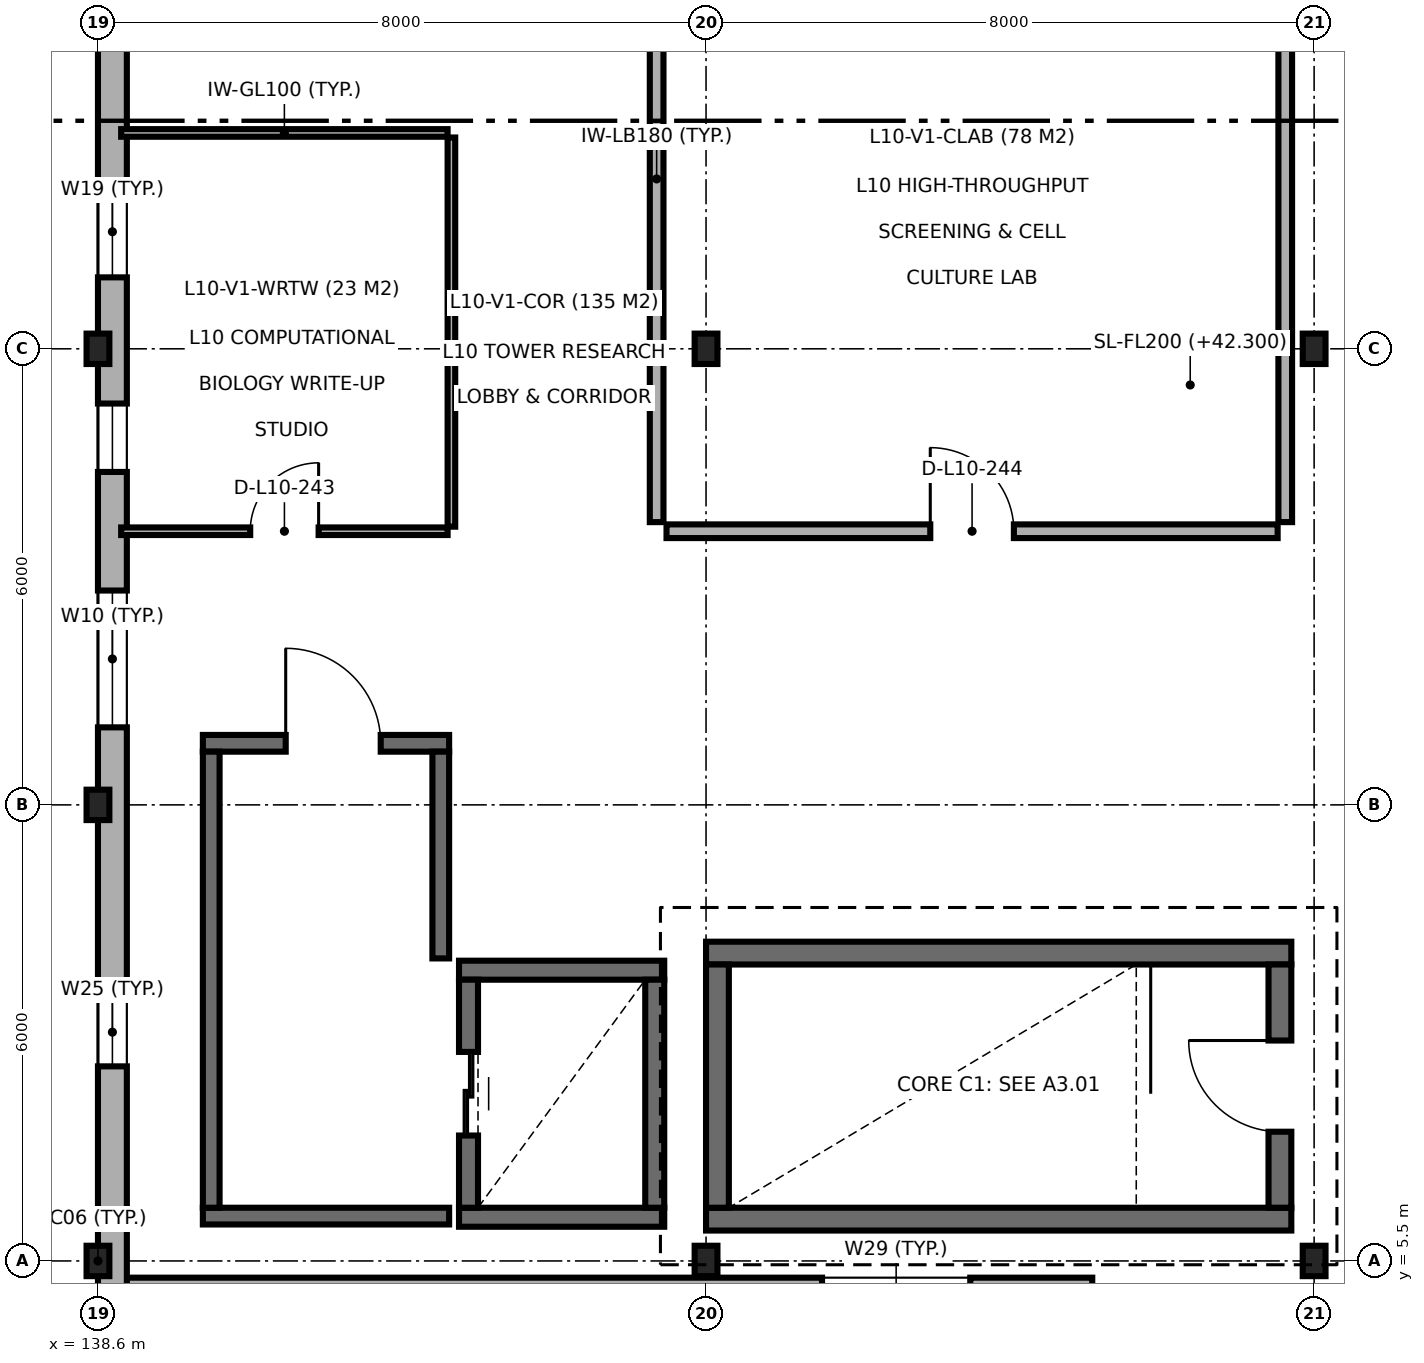
"""IFC4 building model, lengths in metres.
Left out: names, types, materials, properties, quantities, classifications, styles, units other than length and angle.
Written with IfcOpenShell. Run it as: python <this file> out.ifc"""

import sys

from ifc_helpers import new_model, si_unit, direction, frame, frame_2d, origin, origin_2d, place, context, subcontext, project, spatial, rectangle, i_section, extrude, element, fill, save


model = new_model("IFC4")
c1 = context("Model", 3, precision=1e-05, world=origin(), true_north=direction((0.0, 1.0)))
c2 = subcontext(c1, "Body", "Model", "MODEL_VIEW")
j1 = project(units=[si_unit("LENGTHUNIT", "METRE"), si_unit("PLANEANGLEUNIT", "RADIAN")], contexts=[c1])
p1 = place(None, origin())
s1 = spatial("IfcSite", under=j1, at=p1, CompositionType="ELEMENT")
p2 = place(p1, origin())
s2 = spatial("IfcBuilding", under=s1, at=p2, CompositionType="ELEMENT")
p3 = place(p2, frame((0.0, 0.0, 42.3)))
s3 = spatial("IfcBuildingStorey", under=s2, at=p3, CompositionType="ELEMENT", Elevation=42.3)
for number, where, z_axis, x_axis in (
    (1, (138.6, 5.5, 0.0), (0.0, 0.0, 1.0), (1.0, 0.0, 0.0)),
    (2, (138.6, 11.5, 0.0), (0.0, 0.0, 1.0), (1.0, 0.0, 0.0)),
    (3, (138.6, 17.5, 0.0), (0.0, 0.0, 1.0), (1.0, 0.0, 0.0)),
    (4, (146.6, 5.5, 0.0), (0.0, 0.0, 1.0), (1.0, 0.0, 0.0)),
    (5, (146.6, 17.5, 0.0), (0.0, 0.0, 1.0), (1.0, 0.0, 0.0)),
    (6, (154.6, 5.5, 0.0), (0.0, 0.0, 1.0), (1.0, 0.0, 0.0)),
    (7, (154.6, 17.5, 0.0), (0.0, 0.0, 1.0), (1.0, 0.0, 0.0)),
):
    element("IfcColumn", number, at=place(p3, frame(where, z_axis=z_axis, x_axis=x_axis)), inside=s3, PredefinedType="COLUMN", context=c2, shape_type="SweptSolid", body=[
        extrude(i_section(OverallWidth=0.3, OverallDepth=0.4, WebThickness=0.013, FlangeThickness=0.024, FilletRadius=0.027, at=origin_2d()), origin(), (0.0, 0.0, 1.0), 3.9),
    ])
for number, where, z_axis, x_axis in (
    (8, (146.6, 6.05, 0.0), (0.0, 0.0, 1.0), (1.0, 0.0, 0.0)),
    (9, (154.3, 9.55, 0.0), (0.0, 0.0, 1.0), (-1.0, 0.0, 0.0)),
):
    element("IfcWall", number, at=place(p3, frame(where, z_axis=z_axis, x_axis=x_axis)), inside=s3, PredefinedType="SHEAR", context=c2, shape_type="SweptSolid", body=[
        extrude(rectangle(XDim=7.7, YDim=0.3, at=frame_2d((3.85, 0.0))), origin(), (0.0, 0.0, 1.0), 3.9),
    ])
p4 = place(p3, frame((146.75, 9.4, 0.0), z_axis=(0.0, 0.0, 1.0), x_axis=(0.0, -1.0, 0.0)))
e10 = element("IfcWall", 10, at=p4, inside=s3, PredefinedType="SHEAR", context=c2, shape_type="SweptSolid", body=[
    extrude(rectangle(XDim=3.2, YDim=0.3, at=frame_2d((1.6, 0.0))), origin(), (0.0, 0.0, 1.0), 3.9),
])
p5 = place(p3, frame((154.15, 6.2, 0.0), z_axis=(0.0, 0.0, 1.0), x_axis=(0.0, 1.0, 0.0)))
e11 = element("IfcWall", 11, at=p5, inside=s3, PredefinedType="SHEAR", context=c2, shape_type="SweptSolid", body=[
    extrude(rectangle(XDim=3.2, YDim=0.3, at=frame_2d((1.6, 0.0))), origin(), (0.0, 0.0, 1.0), 3.9),
])
p6 = place(p5, frame((1.0, 0.0, 0.0)))
e12 = element("IfcOpeningElement", 12, at=p6, cuts=e11, PredefinedType="OPENING", context=c2, shape_type="SweptSolid", body=[
    extrude(rectangle(XDim=1.2, YDim=2.15, at=frame_2d((0.6, 1.075))), frame((0.0, 0.16, 0.0), z_axis=(0.0, -1.0, 0.0), x_axis=(1.0, 0.0, 0.0)), (0.0, 0.0, 1.0), 0.32),
])
for number, where, z_axis, x_axis in (
    (13, (143.35, 6.075, 0.0), (0.0, 0.0, 1.0), (1.0, 0.0, 0.0)),
    (14, (146.05, 9.325, 0.0), (0.0, 0.0, 1.0), (-1.0, 0.0, 0.0)),
):
    element("IfcWall", number, at=place(p3, frame(where, z_axis=z_axis, x_axis=x_axis)), inside=s3, PredefinedType="SHEAR", context=c2, shape_type="SweptSolid", body=[
        extrude(rectangle(XDim=2.7, YDim=0.25, at=frame_2d((1.35, 0.0))), origin(), (0.0, 0.0, 1.0), 3.9),
    ])
p7 = place(p3, frame((143.475, 9.2, 0.0), z_axis=(0.0, 0.0, 1.0), x_axis=(0.0, -1.0, 0.0)))
e15 = element("IfcWall", 15, at=p7, inside=s3, PredefinedType="SHEAR", context=c2, shape_type="SweptSolid", body=[
    extrude(rectangle(XDim=3.0, YDim=0.25, at=frame_2d((1.5, 0.0))), origin(), (0.0, 0.0, 1.0), 3.9),
])
p8 = place(p7, frame((0.95, 0.0, 0.0)))
e16 = element("IfcOpeningElement", 16, at=p8, cuts=e15, PredefinedType="OPENING", context=c2, shape_type="SweptSolid", body=[
    extrude(rectangle(XDim=1.1, YDim=2.15, at=frame_2d((0.55, 1.075))), frame((0.0, 0.135, 0.0), z_axis=(0.0, -1.0, 0.0), x_axis=(1.0, 0.0, 0.0)), (0.0, 0.0, 1.0), 0.27),
])
p9 = place(p3, frame((145.925, 6.2, 0.0), z_axis=(0.0, 0.0, 1.0), x_axis=(0.0, 1.0, 0.0)))
e17 = element("IfcWall", 17, at=p9, inside=s3, PredefinedType="SHEAR", context=c2, shape_type="SweptSolid", body=[
    extrude(rectangle(XDim=3.0, YDim=0.25, at=frame_2d((1.5, 0.0))), origin(), (0.0, 0.0, 1.0), 3.9),
])
p10 = place(p3, frame((139.98, 6.09, 0.0), z_axis=(0.0, 0.0, 1.0), x_axis=(1.0, 0.0, 0.0)))
e18 = element("IfcWall", 18, at=p10, inside=s3, PredefinedType="SOLIDWALL", context=c2, shape_type="SweptSolid", body=[
    extrude(rectangle(XDim=3.24, YDim=0.22, at=frame_2d((1.62, 0.0))), origin(), (0.0, 0.0, 1.0), 3.66),
])
p11 = place(p3, frame((143.22, 12.31, 0.0), z_axis=(0.0, 0.0, 1.0), x_axis=(-1.0, 0.0, 0.0)))
e19 = element("IfcWall", 19, at=p11, inside=s3, PredefinedType="SOLIDWALL", context=c2, shape_type="SweptSolid", body=[
    extrude(rectangle(XDim=3.24, YDim=0.22, at=frame_2d((1.62, 0.0))), origin(), (0.0, 0.0, 1.0), 3.66),
])
p12 = place(p11, frame((0.9, 0.0, 0.0)))
e20 = element("IfcOpeningElement", 20, at=p12, cuts=e19, PredefinedType="OPENING", context=c2, shape_type="SweptSolid", body=[
    extrude(rectangle(XDim=1.25, YDim=2.15, at=frame_2d((0.625, 1.075))), frame((0.0, 0.12, 0.0), z_axis=(0.0, -1.0, 0.0), x_axis=(1.0, 0.0, 0.0)), (0.0, 0.0, 1.0), 0.24),
])
p13 = place(p3, frame((140.09, 12.2, 0.0), z_axis=(0.0, 0.0, 1.0), x_axis=(0.0, -1.0, 0.0)))
e21 = element("IfcWall", 21, at=p13, inside=s3, PredefinedType="SOLIDWALL", context=c2, shape_type="SweptSolid", body=[
    extrude(rectangle(XDim=6.0, YDim=0.22, at=frame_2d((3.0, 0.0))), origin(), (0.0, 0.0, 1.0), 3.66),
])
p14 = place(p3, frame((143.11, 9.48, 0.0), z_axis=(0.0, 0.0, 1.0), x_axis=(0.0, 1.0, 0.0)))
e22 = element("IfcWall", 22, at=p14, inside=s3, PredefinedType="SOLIDWALL", context=c2, shape_type="SweptSolid", body=[
    extrude(rectangle(XDim=2.72, YDim=0.22, at=frame_2d((1.36, 0.0))), origin(), (0.0, 0.0, 1.0), 3.66),
])
p15 = place(p3, frame((138.962, 5.09, 0.0), z_axis=(0.0, 0.0, 1.0), x_axis=(1.0, 0.0, 0.0)))
e23 = element("IfcWall", 23, at=p15, inside=s3, PredefinedType="SOLIDWALL", context=c2, shape_type="SweptSolid", body=[
    extrude(rectangle(XDim=12.719, YDim=0.38, at=frame_2d((6.359, 0.0))), origin(), (0.0, 0.0, 1.0), 3.66),
])
p16 = place(p15, frame((9.164, 0.0, 0.9)))
e24 = element("IfcOpeningElement", 24, at=p16, cuts=e23, PredefinedType="OPENING", context=c2, shape_type="SweptSolid", body=[
    extrude(rectangle(XDim=1.95, YDim=1.95, at=frame_2d((0.975, 0.975))), frame((0.0, 0.2, 0.0), z_axis=(0.0, -1.0, 0.0), x_axis=(1.0, 0.0, 0.0)), (0.0, 0.0, 1.0), 0.4),
])
p17 = place(p3, frame((138.79, 29.138, 0.0), z_axis=(0.0, 0.0, 1.0), x_axis=(0.0, -1.0, 0.0)))
e25 = element("IfcWall", 25, at=p17, inside=s3, PredefinedType="SOLIDWALL", context=c2, shape_type="SweptSolid", body=[
    extrude(rectangle(XDim=24.238, YDim=0.38, at=frame_2d((12.119, 0.0))), origin(), (0.0, 0.0, 1.0), 3.66),
])
p18 = place(p17, frame((1.664, 0.0, 0.9)))
e26 = element("IfcOpeningElement", 26, at=p18, cuts=e25, PredefinedType="OPENING", context=c2, shape_type="SweptSolid", body=[
    extrude(rectangle(XDim=1.8, YDim=1.5, at=frame_2d((0.9, 0.75))), frame((0.0, 0.2, 0.0), z_axis=(0.0, -1.0, 0.0), x_axis=(1.0, 0.0, 0.0)), (0.0, 0.0, 1.0), 0.4),
])
p19 = place(p17, frame((9.498, 0.0, 0.9)))
e27 = element("IfcOpeningElement", 27, at=p19, cuts=e25, PredefinedType="OPENING", context=c2, shape_type="SweptSolid", body=[
    extrude(rectangle(XDim=1.2, YDim=2.4, at=frame_2d((0.6, 1.2))), frame((0.0, 0.2, 0.0), z_axis=(0.0, -1.0, 0.0), x_axis=(1.0, 0.0, 0.0)), (0.0, 0.0, 1.0), 0.4),
])
p20 = place(p17, frame((12.358, 0.0, 0.9)))
e28 = element("IfcOpeningElement", 28, at=p20, cuts=e25, PredefinedType="OPENING", context=c2, shape_type="SweptSolid", body=[
    extrude(rectangle(XDim=0.9, YDim=1.8, at=frame_2d((0.45, 0.9))), frame((0.0, 0.2, 0.0), z_axis=(0.0, -1.0, 0.0), x_axis=(1.0, 0.0, 0.0)), (0.0, 0.0, 1.0), 0.4),
])
p21 = place(p17, frame((14.818, 0.0, 0.9)))
e29 = element("IfcOpeningElement", 29, at=p21, cuts=e25, PredefinedType="OPENING", context=c2, shape_type="SweptSolid", body=[
    extrude(rectangle(XDim=1.8, YDim=2.1, at=frame_2d((0.9, 1.05))), frame((0.0, 0.2, 0.0), z_axis=(0.0, -1.0, 0.0), x_axis=(1.0, 0.0, 0.0)), (0.0, 0.0, 1.0), 0.4),
])
p22 = place(p17, frame((20.178, 0.0, 0.9)))
e30 = element("IfcOpeningElement", 30, at=p22, cuts=e25, PredefinedType="OPENING", context=c2, shape_type="SweptSolid", body=[
    extrude(rectangle(XDim=0.9, YDim=1.4, at=frame_2d((0.45, 0.7))), frame((0.0, 0.2, 0.0), z_axis=(0.0, -1.0, 0.0), x_axis=(1.0, 0.0, 0.0)), (0.0, 0.0, 1.0), 0.4),
])
p23 = place(p3, frame((138.905, 20.34, 0.0), z_axis=(0.0, 0.0, 1.0), x_axis=(1.0, 0.0, 0.0)))
e31 = element("IfcWall", 31, at=p23, inside=s3, PredefinedType="PARTITIONING", context=c2, shape_type="SweptSolid", body=[
    extrude(rectangle(XDim=4.295, YDim=0.1, at=frame_2d((2.147, 0.0))), origin(), (0.0, 0.0, 1.0), 3.68),
])
p24 = place(p3, frame((143.25, 15.16, 0.0), z_axis=(0.0, 0.0, 1.0), x_axis=(0.0, 1.0, 0.0)))
e32 = element("IfcWall", 32, at=p24, inside=s3, PredefinedType="PARTITIONING", context=c2, shape_type="SweptSolid", body=[
    extrude(rectangle(XDim=5.12, YDim=0.1, at=frame_2d((2.56, 0.0))), origin(), (0.0, 0.0, 1.0), 3.68),
])
p25 = place(p3, frame((138.905, 15.1, 0.0), z_axis=(0.0, 0.0, 1.0), x_axis=(1.0, 0.0, 0.0)))
e33 = element("IfcWall", 33, at=p25, inside=s3, PredefinedType="PARTITIONING", context=c2, shape_type="SweptSolid", body=[
    extrude(rectangle(XDim=4.295, YDim=0.1, at=frame_2d((2.147, 0.0))), origin(), (0.0, 0.0, 1.0), 3.68),
])
p26 = place(p25, frame((1.698, 0.0, 0.0)))
e34 = element("IfcOpeningElement", 34, at=p26, cuts=e33, PredefinedType="OPENING", context=c2, shape_type="SweptSolid", body=[
    extrude(rectangle(XDim=0.9, YDim=2.1, at=frame_2d((0.45, 1.05))), frame((0.0, 0.06, 0.0), z_axis=(0.0, -1.0, 0.0), x_axis=(1.0, 0.0, 0.0)), (0.0, 0.0, 1.0), 0.12),
])
for number, where, z_axis, x_axis in (
    (35, (145.95, 15.22, 0.0), (0.0, 0.0, 1.0), (0.0, 1.0, 0.0)),
    (36, (154.22, 15.22, 0.0), (0.0, 0.0, 1.0), (0.0, 1.0, 0.0)),
):
    element("IfcWall", number, at=place(p3, frame(where, z_axis=z_axis, x_axis=x_axis)), inside=s3, PredefinedType="PARTITIONING", context=c2, shape_type="SweptSolid", body=[
        extrude(rectangle(XDim=9.03, YDim=0.18, at=frame_2d((4.515, 0.0))), origin(), (0.0, 0.0, 1.0), 3.68),
    ])
p27 = place(p3, frame((146.08, 15.1, 0.0), z_axis=(0.0, 0.0, 1.0), x_axis=(1.0, 0.0, 0.0)))
e37 = element("IfcWall", 37, at=p27, inside=s3, PredefinedType="PARTITIONING", context=c2, shape_type="SweptSolid", body=[
    extrude(rectangle(XDim=8.04, YDim=0.18, at=frame_2d((4.02, 0.0))), origin(), (0.0, 0.0, 1.0), 3.68),
])
p28 = place(p27, frame((3.47, 0.0, 0.0)))
e38 = element("IfcOpeningElement", 38, at=p28, cuts=e37, PredefinedType="OPENING", context=c2, shape_type="SweptSolid", body=[
    extrude(rectangle(XDim=1.1, YDim=2.15, at=frame_2d((0.55, 1.075))), frame((0.0, 0.1, 0.0), z_axis=(0.0, -1.0, 0.0), x_axis=(1.0, 0.0, 0.0)), (0.0, 0.0, 1.0), 0.2),
])
p29 = place(p6, origin())
e39 = element("IfcDoor", 39, at=p29, inside=s3, OperationType="SINGLE_SWING_RIGHT", PredefinedType="DOOR", context=c2, shape_type="SweptSolid", body=[
    extrude(rectangle(XDim=1.2, YDim=2.15, at=frame_2d((0.6, 1.075))), frame((0.0, 0.025, 0.0), z_axis=(0.0, -1.0, 0.0), x_axis=(1.0, 0.0, 0.0)), (0.0, 0.0, 1.0), 0.05),
])
fill(e12, e39)
p30 = place(p8, origin())
e40 = element("IfcDoor", 40, at=p30, inside=s3, OperationType="DOUBLE_DOOR_SLIDING", PredefinedType="DOOR", context=c2, shape_type="SweptSolid", body=[
    extrude(rectangle(XDim=1.1, YDim=2.15, at=frame_2d((0.55, 1.075))), frame((0.0, 0.025, 0.0), z_axis=(0.0, -1.0, 0.0), x_axis=(1.0, 0.0, 0.0)), (0.0, 0.0, 1.0), 0.05),
])
fill(e16, e40)
p31 = place(p12, frame((1.25, 0.0, 0.0), z_axis=(0.0, 0.0, 1.0), x_axis=(-1.0, 0.0, 0.0)))
e41 = element("IfcDoor", 41, at=p31, inside=s3, OperationType="SINGLE_SWING_RIGHT", PredefinedType="DOOR", context=c2, shape_type="SweptSolid", body=[
    extrude(rectangle(XDim=1.25, YDim=2.15, at=frame_2d((0.625, 1.075))), frame((0.0, 0.025, 0.0), z_axis=(0.0, -1.0, 0.0), x_axis=(1.0, 0.0, 0.0)), (0.0, 0.0, 1.0), 0.05),
])
fill(e20, e41)
p32 = place(p19, origin())
e42 = element("IfcWindow", 42, at=p32, inside=s3, PartitioningType="SINGLE_PANEL", PredefinedType="WINDOW", context=c2, shape_type="SweptSolid", body=[
    extrude(rectangle(XDim=1.2, YDim=2.4, at=frame_2d((0.6, 1.2))), frame((0.0, 0.03, 0.0), z_axis=(0.0, -1.0, 0.0), x_axis=(1.0, 0.0, 0.0)), (0.0, 0.0, 1.0), 0.06),
])
fill(e27, e42)
p33 = place(p20, origin())
e43 = element("IfcWindow", 43, at=p33, inside=s3, PartitioningType="SINGLE_PANEL", PredefinedType="WINDOW", context=c2, shape_type="SweptSolid", body=[
    extrude(rectangle(XDim=0.9, YDim=1.8, at=frame_2d((0.45, 0.9))), frame((0.0, 0.03, 0.0), z_axis=(0.0, -1.0, 0.0), x_axis=(1.0, 0.0, 0.0)), (0.0, 0.0, 1.0), 0.06),
])
fill(e28, e43)
p34 = place(p21, origin())
e44 = element("IfcWindow", 44, at=p34, inside=s3, PartitioningType="SINGLE_PANEL", PredefinedType="WINDOW", context=c2, shape_type="SweptSolid", body=[
    extrude(rectangle(XDim=1.8, YDim=2.1, at=frame_2d((0.9, 1.05))), frame((0.0, 0.03, 0.0), z_axis=(0.0, -1.0, 0.0), x_axis=(1.0, 0.0, 0.0)), (0.0, 0.0, 1.0), 0.06),
])
fill(e29, e44)
p35 = place(p22, origin())
e45 = element("IfcWindow", 45, at=p35, inside=s3, PartitioningType="SINGLE_PANEL", PredefinedType="WINDOW", context=c2, shape_type="SweptSolid", body=[
    extrude(rectangle(XDim=0.9, YDim=1.4, at=frame_2d((0.45, 0.7))), frame((0.0, 0.03, 0.0), z_axis=(0.0, -1.0, 0.0), x_axis=(1.0, 0.0, 0.0)), (0.0, 0.0, 1.0), 0.06),
])
fill(e30, e45)
p36 = place(p26, origin())
e46 = element("IfcDoor", 46, at=p36, inside=s3, OperationType="SINGLE_SWING_RIGHT", PredefinedType="DOOR", context=c2, shape_type="SweptSolid", body=[
    extrude(rectangle(XDim=0.9, YDim=2.1, at=frame_2d((0.45, 1.05))), frame((0.0, 0.025, 0.0), z_axis=(0.0, -1.0, 0.0), x_axis=(1.0, 0.0, 0.0)), (0.0, 0.0, 1.0), 0.05),
])
fill(e34, e46)
p37 = place(p28, origin())
e47 = element("IfcDoor", 47, at=p37, inside=s3, OperationType="SINGLE_SWING_LEFT", PredefinedType="DOOR", context=c2, shape_type="SweptSolid", body=[
    extrude(rectangle(XDim=1.1, YDim=2.15, at=frame_2d((0.55, 1.075))), frame((0.0, 0.025, 0.0), z_axis=(0.0, -1.0, 0.0), x_axis=(1.0, 0.0, 0.0)), (0.0, 0.0, 1.0), 0.05),
])
fill(e38, e47)
save(model, sys.argv[1])
